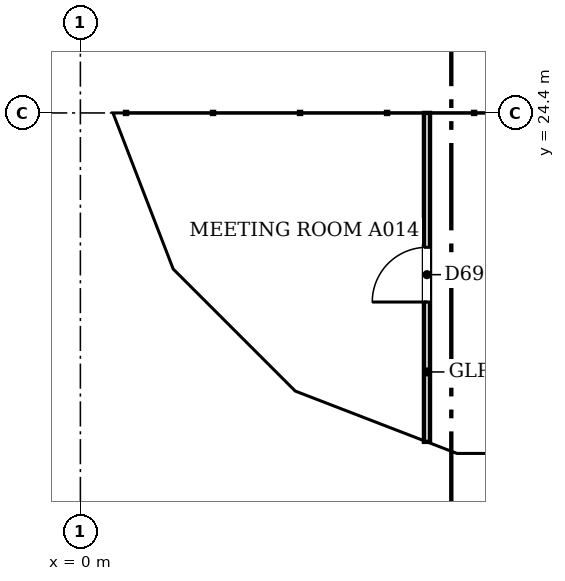
"""IFC4 building model, lengths in metres.
Left out: names, types, materials, properties, quantities, classifications, styles, units other than length and angle.
Written with IfcOpenShell. Run it as: python <this file> out.ifc"""

import sys

from ifc_helpers import new_model, si_unit, direction, frame, frame_2d, origin, place, context, subcontext, project, spatial, polyline, rectangle, outline, extrude, faceted_brep, source, transform, mapped, element, fill, save


model = new_model("IFC4")
c1 = context("Model", 3, precision=1e-05, world=origin(), true_north=direction((0.0, 1.0)))
c2 = subcontext(c1, "Body", "Model", "MODEL_VIEW")
j1 = project(units=[si_unit("LENGTHUNIT", "METRE"), si_unit("PLANEANGLEUNIT", "RADIAN")], contexts=[c1])
p1 = place(None, origin())
s1 = spatial("IfcSite", under=j1, at=p1, CompositionType="ELEMENT")
p2 = place(p1, origin())
s2 = spatial("IfcBuilding", under=s1, at=p2, CompositionType="ELEMENT")
p3 = place(p2, frame((0.0, 0.0, 178.2)))
s3 = spatial("IfcBuildingStorey", under=s2, at=p3, CompositionType="ELEMENT", Elevation=178.2)
m1 = source(origin(), c2, "Body", "Brep", [
    faceted_brep([(3.05, -0.25, 0.0), (6.053, -0.25, 3.8), (3.05, -0.25, 7.6), (0.0, -0.25, 3.8), (0.0, 0.25, 3.8), (3.05, 0.25, 7.6), (6.007, 0.25, 3.859), (6.007, 0.25, 3.741), (3.05, 0.25, 0.0), (6.053, 0.0, 3.8)], [[[0, 1, 2, 3]], [[4, 5, 6, 7, 8]], [[8, 7, 9, 1, 0]], [[6, 5, 2, 1, 9]], [[5, 4, 3, 2]], [[4, 8, 0, 3]], [[9, 7, 6]]]),
])
p4 = place(p3, frame((0.25, 30.5, -3.8), z_axis=(0.0, 0.0, 1.0), x_axis=(0.0, -1.0, 0.0)))
e1 = element("IfcWall", 1, at=p4, inside=s3, PredefinedType="SOLIDWALL", context=c2, shape_type="MappedRepresentation", body=[
    mapped(m1, transform((0.0, 0.0, 0.0), scale=1.0)),
])
m2 = source(origin(), c2, "Body", "SweptSolid", [
    extrude(outline(polyline([(3.049, 0.401), (5.735, 3.8), (3.049, 7.199), (0.321, 3.8), (3.049, 0.401)])), frame((0.0, 0.26, 0.0), z_axis=(0.0, -1.0, 0.0), x_axis=(1.0, 0.0, 0.0)), (0.0, 0.0, 1.0), 0.52),
])
p5 = place(p4, origin())
e2 = element("IfcOpeningElement", 2, at=p5, cuts=e1, PredefinedType="OPENING", context=c2, shape_type="MappedRepresentation", body=[
    mapped(m2, transform((0.0, 0.0, 0.0), scale=1.0)),
])
m3 = source(origin(), c2, "Body", "Brep", [
    faceted_brep([(2.95, -0.25, 0.0), (3.003, -0.25, 0.068), (3.003, -0.25, 7.532), (2.95, -0.25, 7.6), (0.0, -0.25, 3.8), (0.047, 0.25, 3.86), (2.898, 0.25, 7.532), (2.898, 0.25, 0.068), (0.047, 0.25, 3.74), (2.95, 0.0, 0.0), (2.95, 0.0, 7.6), (0.0, 0.0, 3.8)], [[[0, 1, 2, 3, 4]], [[5, 6, 7, 8]], [[1, 0, 9]], [[10, 3, 2]], [[6, 5, 11, 4, 3, 10]], [[8, 7, 9, 0, 4, 11]], [[8, 11, 5]], [[1, 9, 7, 6, 10, 2]]]),
])
p6 = place(p3, frame((0.25, 24.447, -3.8), z_axis=(0.0, 0.0, 1.0), x_axis=(0.35992665181, -0.932980602862, 0.0)))
e3 = element("IfcWall", 3, at=p6, inside=s3, PredefinedType="SOLIDWALL", context=c2, shape_type="MappedRepresentation", body=[
    mapped(m3, transform((0.0, 0.0, 0.0), scale=1.0)),
])
m4 = source(origin(), c2, "Body", "SweptSolid", [
    extrude(outline(polyline([(2.75, 6.935), (0.316, 3.8), (2.75, 0.665), (2.75, 6.935)])), frame((0.0, 0.26, 0.0), z_axis=(0.0, -1.0, 0.0), x_axis=(1.0, 0.0, 0.0)), (0.0, 0.0, 1.0), 0.52),
])
p7 = place(p6, origin())
e4 = element("IfcOpeningElement", 4, at=p7, cuts=e3, PredefinedType="OPENING", context=c2, shape_type="MappedRepresentation", body=[
    mapped(m4, transform((0.0, 0.0, 0.0), scale=1.0)),
])
m5 = source(origin(), c2, "Body", "Brep", [
    faceted_brep([(0.053, -0.25, 0.0), (2.997, -0.25, 3.8), (0.053, -0.25, 7.6), (0.0, -0.25, 7.532), (0.0, -0.25, 0.068), (0.106, 0.25, 7.532), (2.944, 0.25, 3.868), (2.944, 0.25, 3.732), (0.106, 0.25, 0.068), (2.997, 0.0, 3.8), (0.053, 0.0, 0.0), (0.053, 0.0, 7.6)], [[[0, 1, 2, 3, 4]], [[5, 6, 7, 8]], [[8, 7, 9, 1, 0, 10]], [[6, 5, 11, 2, 1, 9]], [[3, 2, 11]], [[10, 0, 4]], [[8, 10, 4, 3, 11, 5]], [[9, 7, 6]]]),
])
p8 = place(p3, frame((1.274, 21.731, -3.8), z_axis=(0.0, 0.0, 1.0), x_axis=(0.707147509625, -0.707066050402, 0.0)))
e5 = element("IfcWall", 5, at=p8, inside=s3, PredefinedType="SOLIDWALL", context=c2, shape_type="MappedRepresentation", body=[
    mapped(m5, transform((0.0, 0.0, 0.0), scale=1.0)),
])
m6 = source(origin(), c2, "Body", "SweptSolid", [
    extrude(outline(polyline([(0.253, 0.667), (2.681, 3.8), (0.253, 6.934), (0.253, 0.667)])), frame((0.0, 0.26, 0.0), z_axis=(0.0, -1.0, 0.0), x_axis=(1.0, 0.0, 0.0)), (0.0, 0.0, 1.0), 0.52),
])
p9 = place(p8, origin())
e6 = element("IfcOpeningElement", 6, at=p9, cuts=e5, PredefinedType="OPENING", context=c2, shape_type="MappedRepresentation", body=[
    mapped(m6, transform((0.0, 0.0, 0.0), scale=1.0)),
])
m7 = source(origin(), c2, "Body", "Brep", [
    faceted_brep([(2.95, -0.25, 0.0), (2.997, -0.25, 0.059), (2.997, -0.25, 7.541), (2.95, -0.25, 7.6), (0.0, -0.25, 3.8), (0.053, 0.25, 3.868), (2.904, 0.25, 7.54), (2.904, 0.25, 0.06), (0.053, 0.25, 3.732), (2.95, 0.0, 0.0), (2.95, 0.0, 7.6), (0.0, 0.0, 3.8)], [[[0, 1, 2, 3, 4]], [[5, 6, 7, 8]], [[1, 0, 9]], [[10, 3, 2]], [[6, 5, 11, 4, 3, 10]], [[8, 7, 9, 0, 4, 11]], [[8, 11, 5]], [[1, 9, 7, 6, 10, 2]]]),
])
p10 = place(p3, frame((3.394, 19.612, -3.8), z_axis=(0.0, 0.0, 1.0), x_axis=(0.932990326376, -0.359901446078, 0.0)))
e7 = element("IfcWall", 7, at=p10, inside=s3, PredefinedType="SOLIDWALL", context=c2, shape_type="MappedRepresentation", body=[
    mapped(m7, transform((0.0, 0.0, 0.0), scale=1.0)),
])
p11 = place(p10, origin())
e8 = element("IfcOpeningElement", 8, at=p11, cuts=e7, PredefinedType="OPENING", context=c2, shape_type="MappedRepresentation", body=[
    mapped(m4, transform((0.0, 0.0, 0.0), scale=1.0)),
])
m8 = source(origin(), c2, "Body", "Brep", [
    faceted_brep([(0.047, -0.25, 0.0), (3.05, -0.25, 3.8), (0.047, -0.25, 7.6), (0.0, -0.25, 7.54), (0.0, -0.25, 0.06), (0.093, 0.25, 7.541), (3.05, 0.25, 3.8), (0.093, 0.25, 0.059), (0.047, 0.0, 0.0), (0.047, 0.0, 7.6)], [[[0, 1, 2, 3, 4]], [[5, 6, 7]], [[7, 6, 1, 0, 8]], [[6, 5, 9, 2, 1]], [[3, 2, 9]], [[8, 0, 4]], [[7, 8, 4, 3, 9, 5]]]),
])
p12 = place(p3, frame((6.1, 18.55, -3.8), z_axis=(0.0, 0.0, 1.0), x_axis=(1.0, 0.0, 0.0)))
e9 = element("IfcWall", 9, at=p12, inside=s3, PredefinedType="SOLIDWALL", context=c2, shape_type="MappedRepresentation", body=[
    mapped(m8, transform((0.0, 0.0, 0.0), scale=1.0)),
])
m9 = source(origin(), c2, "Body", "SweptSolid", [
    extrude(outline(polyline([(0.247, 0.656), (2.731, 3.8), (0.247, 6.944), (0.247, 0.656)])), frame((0.0, 0.26, 0.0), z_axis=(0.0, -1.0, 0.0), x_axis=(1.0, 0.0, 0.0)), (0.0, 0.0, 1.0), 0.52),
])
p13 = place(p12, origin())
e10 = element("IfcOpeningElement", 10, at=p13, cuts=e9, PredefinedType="OPENING", context=c2, shape_type="MappedRepresentation", body=[
    mapped(m9, transform((0.0, 0.0, 0.0), scale=1.0)),
])
p14 = place(p2, frame((0.0, 0.0, 182.0)))
s4 = spatial("IfcBuildingStorey", under=s2, at=p14, CompositionType="ELEMENT", Elevation=182.0)
m10 = source(origin(), c2, "Body", "Brep", [
    faceted_brep([(3.003, -0.25, 0.0), (3.05, -0.25, 0.06), (3.05, -0.25, 7.54), (3.003, -0.25, 7.6), (0.0, -0.25, 3.8), (0.0, 0.25, 3.8), (2.957, 0.25, 7.541), (2.957, 0.25, 0.059), (3.003, 0.0, 0.0), (3.003, 0.0, 7.6)], [[[0, 1, 2, 3, 4]], [[5, 6, 7]], [[1, 0, 8]], [[9, 3, 2]], [[6, 5, 4, 3, 9]], [[5, 7, 8, 0, 4]], [[1, 8, 7, 6, 9, 2]]]),
])
p15 = place(p14, frame((0.25, 27.45, -3.8), z_axis=(0.0, 0.0, 1.0), x_axis=(0.0, -1.0, 0.0)))
e11 = element("IfcWall", 11, at=p15, inside=s4, PredefinedType="SOLIDWALL", context=c2, shape_type="MappedRepresentation", body=[
    mapped(m10, transform((0.0, 0.0, 0.0), scale=1.0)),
])
m11 = source(origin(), c2, "Body", "SweptSolid", [
    extrude(outline(polyline([(2.803, 6.944), (0.319, 3.8), (2.803, 0.656), (2.803, 6.944)])), frame((0.0, 0.26, 0.0), z_axis=(0.0, -1.0, 0.0), x_axis=(1.0, 0.0, 0.0)), (0.0, 0.0, 1.0), 0.52),
])
p16 = place(p15, origin())
e12 = element("IfcOpeningElement", 12, at=p16, cuts=e11, PredefinedType="OPENING", context=c2, shape_type="MappedRepresentation", body=[
    mapped(m11, transform((0.0, 0.0, 0.0), scale=1.0)),
])
m12 = source(origin(), c2, "Body", "Brep", [
    faceted_brep([(0.047, -0.25, 0.0), (2.997, -0.25, 3.8), (0.047, -0.25, 7.6), (0.0, -0.25, 7.541), (0.0, -0.25, 0.059), (0.093, 0.25, 7.54), (2.944, 0.25, 3.868), (2.944, 0.25, 3.732), (0.093, 0.25, 0.06), (2.997, 0.0, 3.8), (0.047, 0.0, 0.0), (0.047, 0.0, 7.6)], [[[0, 1, 2, 3, 4]], [[5, 6, 7, 8]], [[8, 7, 9, 1, 0, 10]], [[6, 5, 11, 2, 1, 9]], [[3, 2, 11]], [[10, 0, 4]], [[8, 10, 4, 3, 11, 5]], [[9, 7, 6]]]),
])
p17 = place(p14, frame((0.233, 24.49, -3.8), z_axis=(0.0, 0.0, 1.0), x_axis=(0.359901446078, -0.932990326376, 0.0)))
e13 = element("IfcWall", 13, at=p17, inside=s4, PredefinedType="SOLIDWALL", context=c2, shape_type="MappedRepresentation", body=[
    mapped(m12, transform((0.0, 0.0, 0.0), scale=1.0)),
])
m13 = source(origin(), c2, "Body", "SweptSolid", [
    extrude(outline(polyline([(0.247, 0.665), (2.681, 3.8), (0.247, 6.935), (0.247, 0.665)])), frame((0.0, 0.26, 0.0), z_axis=(0.0, -1.0, 0.0), x_axis=(1.0, 0.0, 0.0)), (0.0, 0.0, 1.0), 0.52),
])
p18 = place(p17, origin())
e14 = element("IfcOpeningElement", 14, at=p18, cuts=e13, PredefinedType="OPENING", context=c2, shape_type="MappedRepresentation", body=[
    mapped(m13, transform((0.0, 0.0, 0.0), scale=1.0)),
])
m14 = source(origin(), c2, "Body", "Brep", [
    faceted_brep([(2.944, -0.25, 0.0), (2.997, -0.25, 0.068), (2.997, -0.25, 7.532), (2.944, -0.25, 7.6), (0.0, -0.25, 3.8), (0.053, 0.25, 3.868), (2.891, 0.25, 7.532), (2.891, 0.25, 0.068), (0.053, 0.25, 3.732), (2.944, 0.0, 0.0), (2.944, 0.0, 7.6), (0.0, 0.0, 3.8)], [[[0, 1, 2, 3, 4]], [[5, 6, 7, 8]], [[1, 0, 9]], [[10, 3, 2]], [[6, 5, 11, 4, 3, 10]], [[8, 7, 9, 0, 4, 11]], [[8, 11, 5]], [[1, 9, 7, 6, 10, 2]]]),
])
p19 = place(p14, frame((1.312, 21.694, -3.8), z_axis=(0.0, 0.0, 1.0), x_axis=(0.707066050402, -0.707147509625, 0.0)))
e15 = element("IfcWall", 15, at=p19, inside=s4, PredefinedType="SOLIDWALL", context=c2, shape_type="MappedRepresentation", body=[
    mapped(m14, transform((0.0, 0.0, 0.0), scale=1.0)),
])
m15 = source(origin(), c2, "Body", "SweptSolid", [
    extrude(outline(polyline([(2.744, 6.934), (0.316, 3.8), (2.744, 0.666), (2.744, 6.934)])), frame((0.0, 0.26, 0.0), z_axis=(0.0, -1.0, 0.0), x_axis=(1.0, 0.0, 0.0)), (0.0, 0.0, 1.0), 0.52),
])
p20 = place(p19, origin())
e16 = element("IfcOpeningElement", 16, at=p20, cuts=e15, PredefinedType="OPENING", context=c2, shape_type="MappedRepresentation", body=[
    mapped(m15, transform((0.0, 0.0, 0.0), scale=1.0)),
])
m16 = source(origin(), c2, "Body", "Brep", [
    faceted_brep([(0.053, -0.25, 0.0), (3.003, -0.25, 3.8), (0.053, -0.25, 7.6), (0.0, -0.25, 7.532), (0.0, -0.25, 0.068), (0.106, 0.25, 7.532), (2.957, 0.25, 3.86), (2.957, 0.25, 3.74), (0.106, 0.25, 0.068), (3.003, 0.0, 3.8), (0.053, 0.0, 0.0), (0.053, 0.0, 7.6)], [[[0, 1, 2, 3, 4]], [[5, 6, 7, 8]], [[8, 7, 9, 1, 0, 10]], [[6, 5, 11, 2, 1, 9]], [[3, 2, 11]], [[10, 0, 4]], [[8, 10, 4, 3, 11, 5]], [[9, 7, 6]]]),
])
p21 = place(p14, frame((3.344, 19.631, -3.8), z_axis=(0.0, 0.0, 1.0), x_axis=(0.933007896601, -0.359855894603, 0.0)))
e17 = element("IfcWall", 17, at=p21, inside=s4, PredefinedType="SOLIDWALL", context=c2, shape_type="MappedRepresentation", body=[
    mapped(m16, transform((0.0, 0.0, 0.0), scale=1.0)),
])
m17 = source(origin(), c2, "Body", "SweptSolid", [
    extrude(outline(polyline([(0.253, 0.665), (2.687, 3.8), (0.253, 6.935), (0.253, 0.665)])), frame((0.0, 0.26, 0.0), z_axis=(0.0, -1.0, 0.0), x_axis=(1.0, 0.0, 0.0)), (0.0, 0.0, 1.0), 0.52),
])
p22 = place(p21, origin())
e18 = element("IfcOpeningElement", 18, at=p22, cuts=e17, PredefinedType="OPENING", context=c2, shape_type="MappedRepresentation", body=[
    mapped(m17, transform((0.0, 0.0, 0.0), scale=1.0)),
])
m18 = source(origin(), c2, "Body", "Brep", [
    faceted_brep([(3.003, -0.25, 0.0), (6.053, -0.25, 3.8), (3.003, -0.25, 7.6), (0.0, -0.25, 3.8), (0.047, 0.25, 3.859), (3.003, 0.25, 7.6), (6.053, 0.25, 3.8), (3.003, 0.25, 0.0), (0.047, 0.25, 3.741), (0.0, 0.0, 3.8)], [[[0, 1, 2, 3]], [[4, 5, 6, 7, 8]], [[7, 6, 1, 0]], [[6, 5, 2, 1]], [[5, 4, 9, 3, 2]], [[8, 7, 0, 3, 9]], [[8, 9, 4]]]),
])
p23 = place(p14, frame((6.146, 18.55, -3.8), z_axis=(0.0, 0.0, 1.0), x_axis=(1.0, 0.0, 0.0)))
e19 = element("IfcWall", 19, at=p23, inside=s4, PredefinedType="SOLIDWALL", context=c2, shape_type="MappedRepresentation", body=[
    mapped(m18, transform((0.0, 0.0, 0.0), scale=1.0)),
])
m19 = source(origin(), c2, "Body", "SweptSolid", [
    extrude(outline(polyline([(3.005, 0.401), (5.733, 3.8), (3.005, 7.199), (0.319, 3.8), (3.005, 0.401)])), frame((0.0, 0.26, 0.0), z_axis=(0.0, -1.0, 0.0), x_axis=(1.0, 0.0, 0.0)), (0.0, 0.0, 1.0), 0.52),
])
p24 = place(p23, origin())
e20 = element("IfcOpeningElement", 20, at=p24, cuts=e19, PredefinedType="OPENING", context=c2, shape_type="MappedRepresentation", body=[
    mapped(m19, transform((0.0, 0.0, 0.0), scale=1.0)),
])
p25 = place(p3, frame((5.7, 18.99, 0.0), z_axis=(0.0, 0.0, 1.0), x_axis=(0.0, 1.0, 0.0)))
e21 = element("IfcWall", 21, at=p25, inside=s3, PredefinedType="PARTITIONING", context=c2, shape_type="SweptSolid", body=[
    extrude(rectangle(XDim=5.41, YDim=0.1, at=frame_2d((2.705, 0.0))), origin(), (0.0, 0.0, 1.0), 3.067),
])
m20 = source(origin(), c2, "Body", "SweptSolid", [
    extrude(rectangle(XDim=0.9, YDim=2.1, at=frame_2d((0.45, 1.05))), frame((0.0, 0.06, 0.0), z_axis=(0.0, -1.0, 0.0), x_axis=(1.0, 0.0, 0.0)), (0.0, 0.0, 1.0), 0.12),
])
p26 = place(p25, frame((2.3, 0.0, 0.0)))
e22 = element("IfcOpeningElement", 22, at=p26, cuts=e21, PredefinedType="OPENING", context=c2, shape_type="MappedRepresentation", body=[
    mapped(m20, transform((0.0, 0.0, 0.0), scale=1.0)),
])
m21 = source(origin(), c2, "Body", "SweptSolid", [
    extrude(rectangle(XDim=0.9, YDim=2.1, at=frame_2d((0.45, 1.05))), frame((0.0, 0.025, 0.0), z_axis=(0.0, -1.0, 0.0), x_axis=(1.0, 0.0, 0.0)), (0.0, 0.0, 1.0), 0.05),
])
p27 = place(p26, origin())
e23 = element("IfcDoor", 23, at=p27, inside=s3, OperationType="SINGLE_SWING_LEFT", PredefinedType="DOOR", context=c2, shape_type="MappedRepresentation", body=[
    mapped(m21, transform((0.0, 0.0, 0.0), scale=1.0)),
])
fill(e22, e23)
save(model, sys.argv[1])
